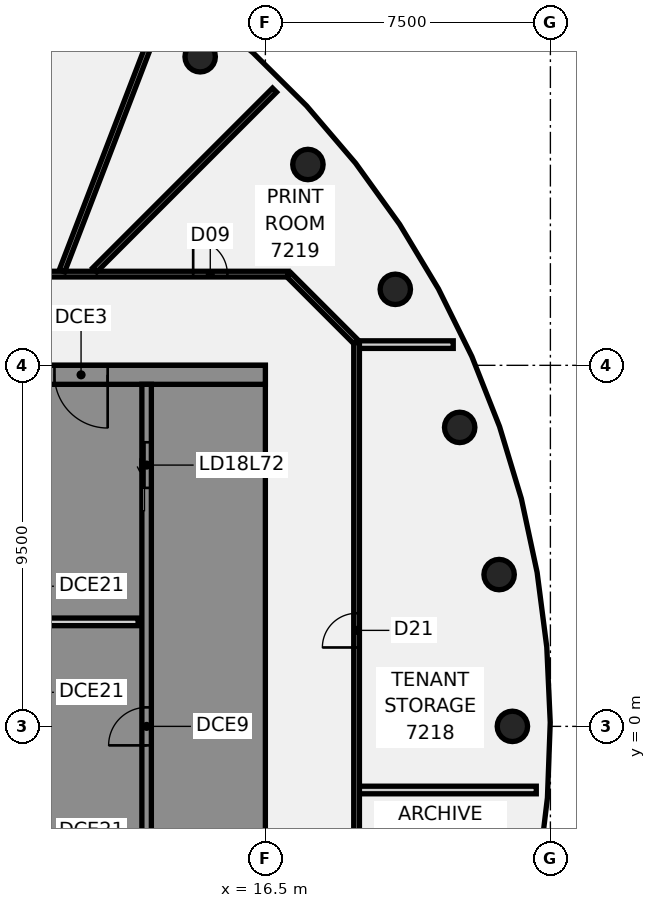
"""IFC4 building model, lengths in metres.
Left out: names, types, materials, properties, quantities, classifications, styles, units other than length and angle.
Written with IfcOpenShell. Run it as: python <this file> out.ifc"""

import sys

from ifc_helpers import new_model, si_unit, direction, frame, frame_2d, origin, origin_2d, place, context, subcontext, project, spatial, polyline, rectangle, circle, outline, extrude, element, fill, save


model = new_model("IFC4")
c1 = context("Model", 3, precision=1e-05, world=origin(), true_north=direction((0.0, 1.0)))
c2 = subcontext(c1, "Body", "Model", "MODEL_VIEW")
j1 = project(units=[si_unit("LENGTHUNIT", "METRE"), si_unit("PLANEANGLEUNIT", "RADIAN")], contexts=[c1])
p1 = place(None, origin())
s1 = spatial("IfcSite", under=j1, at=p1, CompositionType="ELEMENT")
p2 = place(p1, origin())
s2 = spatial("IfcBuilding", under=s1, at=p2, CompositionType="ELEMENT")
p3 = place(p2, frame((0.0, 0.0, 287.4)))
s3 = spatial("IfcBuildingStorey", under=s2, at=p3, CompositionType="ELEMENT", Elevation=287.4)
for number, where, z_axis, x_axis in (
    (1, (23.0, 0.0, -0.2), (0.0, 0.0, 1.0), (1.0, 0.0, 0.0)),
    (2, (22.651, 3.994, -0.2), (0.0, 0.0, 1.0), (1.0, 0.0, 0.0)),
    (3, (21.613, 7.866, -0.2), (0.0, 0.0, 1.0), (1.0, 0.0, 0.0)),
    (4, (19.919, 11.5, -0.2), (0.0, 0.0, 1.0), (1.0, 0.0, 0.0)),
    (5, (17.619, 14.784, -0.2), (0.0, 0.0, 1.0), (1.0, 0.0, 0.0)),
    (6, (14.784, 17.619, -0.2), (0.0, 0.0, 1.0), (1.0, 0.0, 0.0)),
):
    element("IfcColumn", number, at=place(p3, frame(where, z_axis=z_axis, x_axis=x_axis)), inside=s3, PredefinedType="COLUMN", context=c2, shape_type="SweptSolid", body=[
        extrude(circle(Radius=0.4, at=origin_2d()), origin(), (0.0, 0.0, 1.0), 7.0),
    ])
p4 = place(p3, frame((17.128, 11.872, 0.0), z_axis=(0.0, 0.0, 1.0), x_axis=(0.707106781187, -0.707106781187, 0.0)))
e7 = element("IfcWall", 7, at=p4, inside=s3, PredefinedType="PARTITIONING", context=c2, shape_type="SweptSolid", body=[
    extrude(rectangle(XDim=2.486, YDim=0.15, at=frame_2d((1.243, 0.0))), origin(), (0.0, 0.0, 1.0), 6.1),
])
p5 = place(p3, frame((-17.065, 11.9, 0.0), z_axis=(0.0, 0.0, 1.0), x_axis=(1.0, 0.0, 0.0)))
e8 = element("IfcWall", 8, at=p5, inside=s3, PredefinedType="PARTITIONING", context=c2, shape_type="SweptSolid", body=[
    extrude(rectangle(XDim=34.165, YDim=0.15, at=frame_2d((17.083, 0.0))), origin(), (0.0, 0.0, 1.0), 6.1),
])
p6 = place(p5, frame((24.252, 0.0, 0.0)))
e9 = element("IfcOpeningElement", 9, at=p6, cuts=e8, PredefinedType="OPENING", context=c2, shape_type="SweptSolid", body=[
    extrude(rectangle(XDim=1.8, YDim=2.1, at=frame_2d((0.9, 1.05))), frame((0.0, 0.085, 0.0), z_axis=(0.0, -1.0, 0.0), x_axis=(1.0, 0.0, 0.0)), (0.0, 0.0, 1.0), 0.17),
])
p7 = place(p5, frame((31.665, 0.0, 0.0)))
e10 = element("IfcOpeningElement", 10, at=p7, cuts=e8, PredefinedType="OPENING", context=c2, shape_type="SweptSolid", body=[
    extrude(rectangle(XDim=0.9, YDim=2.1, at=frame_2d((0.45, 1.05))), frame((0.0, 0.085, 0.0), z_axis=(0.0, -1.0, 0.0), x_axis=(1.0, 0.0, 0.0)), (0.0, 0.0, 1.0), 0.17),
])
p8 = place(p5, frame((10.415, 0.0, 0.0)))
e11 = element("IfcOpeningElement", 11, at=p8, cuts=e8, PredefinedType="OPENING", context=c2, shape_type="SweptSolid", body=[
    extrude(rectangle(XDim=1.8, YDim=2.1, at=frame_2d((0.9, 1.05))), frame((0.0, 0.085, 0.0), z_axis=(0.0, -1.0, 0.0), x_axis=(1.0, 0.0, 0.0)), (0.0, 0.0, 1.0), 0.17),
])
p9 = place(p3, frame((18.955, -1.674, 0.0), z_axis=(0.0, 0.0, 1.0), x_axis=(1.0, 0.0, 0.0)))
e12 = element("IfcWall", 12, at=p9, inside=s3, PredefinedType="PARTITIONING", context=c2, shape_type="SweptSolid", body=[
    extrude(rectangle(XDim=4.674, YDim=0.2, at=frame_2d((2.337, 0.0))), origin(), (0.0, 0.0, 1.0), 6.1),
])
p10 = place(p3, frame((18.955, 10.045, 0.0), z_axis=(0.0, 0.0, 1.0), x_axis=(1.0, 0.0, 0.0)))
e13 = element("IfcWall", 13, at=p10, inside=s3, PredefinedType="PARTITIONING", context=c2, shape_type="SweptSolid", body=[
    extrude(rectangle(XDim=2.489, YDim=0.2, at=frame_2d((1.244, 0.0))), origin(), (0.0, 0.0, 1.0), 6.1),
])
p11 = place(p3, frame((12.01, 12.01, 0.0), z_axis=(0.0, 0.0, 1.0), x_axis=(0.707106781187, 0.707106781187, 0.0)))
e14 = element("IfcWall", 14, at=p11, inside=s3, PredefinedType="PARTITIONING", context=c2, shape_type="SweptSolid", body=[
    extrude(rectangle(XDim=6.691, YDim=0.15, at=frame_2d((3.345, 0.0))), origin(), (0.0, 0.0, 1.0), 6.1),
])
p12 = place(p3, frame((11.147, 11.984, 0.0), z_axis=(0.0, 0.0, 1.0), x_axis=(0.358991844547, 0.933340696396, 0.0)))
e15 = element("IfcWall", 15, at=p12, inside=s3, PredefinedType="PARTITIONING", context=c2, shape_type="SweptSolid", body=[
    extrude(rectangle(XDim=7.69, YDim=0.15, at=frame_2d((3.845, 0.0))), origin(), (0.0, 0.0, 1.0), 6.1),
])
p13 = place(p3, frame((18.9, -10.1, 0.0), z_axis=(0.0, 0.0, 1.0), x_axis=(0.0, 1.0, 0.0)))
e16 = element("IfcWall", 16, at=p13, inside=s3, PredefinedType="PARTITIONING", context=c2, shape_type="SweptSolid", body=[
    extrude(rectangle(XDim=20.2, YDim=0.15, at=frame_2d((10.1, 0.0))), origin(), (0.0, 0.0, 1.0), 6.1),
])
p14 = place(p13, frame((4.95, 0.0, 0.0)))
e17 = element("IfcOpeningElement", 17, at=p14, cuts=e16, PredefinedType="OPENING", context=c2, shape_type="SweptSolid", body=[
    extrude(rectangle(XDim=0.9, YDim=2.1, at=frame_2d((0.45, 1.05))), frame((0.0, 0.085, 0.0), z_axis=(0.0, -1.0, 0.0), x_axis=(1.0, 0.0, 0.0)), (0.0, 0.0, 1.0), 0.17),
])
p15 = place(p13, frame((12.176, 0.0, 0.0)))
e18 = element("IfcOpeningElement", 18, at=p15, cuts=e16, PredefinedType="OPENING", context=c2, shape_type="SweptSolid", body=[
    extrude(rectangle(XDim=0.9, YDim=2.1, at=frame_2d((0.45, 1.05))), frame((0.0, 0.085, 0.0), z_axis=(0.0, -1.0, 0.0), x_axis=(1.0, 0.0, 0.0)), (0.0, 0.0, 1.0), 0.17),
])
p16 = place(p3, frame((16.5, 9.25, 0.0), z_axis=(0.0, 0.0, 1.0), x_axis=(-1.0, 0.0, 0.0)))
e19 = element("IfcWall", 19, at=p16, inside=s3, PredefinedType="SHEAR", context=c2, shape_type="SweptSolid", body=[
    extrude(rectangle(XDim=13.0, YDim=0.5, at=frame_2d((6.5, 0.0))), origin(), (0.0, 0.0, 1.0), 6.8),
])
p17 = place(p16, frame((4.15, 0.0, 0.0)))
e20 = element("IfcOpeningElement", 20, at=p17, cuts=e19, PredefinedType="OPENING", context=c2, shape_type="SweptSolid", body=[
    extrude(rectangle(XDim=1.4, YDim=2.1, at=frame_2d((0.7, 1.05))), frame((0.0, 0.26, 0.0), z_axis=(0.0, -1.0, 0.0), x_axis=(1.0, 0.0, 0.0)), (0.0, 0.0, 1.0), 0.52),
])
p18 = place(p3, frame((13.15, 2.75, 0.0), z_axis=(0.0, 0.0, 1.0), x_axis=(-1.0, 0.0, 0.0)))
e21 = element("IfcWall", 21, at=p18, inside=s3, PredefinedType="PARTITIONING", context=c2, shape_type="SweptSolid", body=[
    extrude(rectangle(XDim=3.0, YDim=0.2, at=frame_2d((1.5, 0.0))), origin(), (0.0, 0.0, 1.0), 6.8),
])
p19 = place(p3, origin())
e22 = element("IfcWall", 22, at=p19, inside=s3, PredefinedType="SHEAR", context=c2, shape_type="SweptSolid", body=[
    extrude(outline(polyline([(13.5, -8.125), (13.5, -9.0), (16.0, -9.0), (16.5, -9.0), (16.5, 9.0), (16.0, 9.0), (13.5, 9.0), (13.5, 8.125), (16.0, 8.125), (16.0, 5.625), (13.5, 5.625), (13.5, 5.375), (16.0, 5.375), (16.0, -5.375), (13.5, -5.375), (13.5, -5.625), (16.0, -5.625), (16.0, -8.125), (13.5, -8.125)])), origin(), (0.0, 0.0, 1.0), 6.8),
])
p20 = place(p3, frame((13.375, -9.0, 0.0), z_axis=(0.0, 0.0, 1.0), x_axis=(0.0, 1.0, 0.0)))
e23 = element("IfcWall", 23, at=p20, inside=s3, PredefinedType="SHEAR", context=c2, shape_type="SweptSolid", body=[
    extrude(rectangle(XDim=18.0, YDim=0.25, at=frame_2d((9.0, 0.0))), origin(), (0.0, 0.0, 1.0), 6.8),
])
p21 = place(p20, frame((1.425, 0.0, 0.0)))
e24 = element("IfcOpeningElement", 24, at=p21, cuts=e23, PredefinedType="OPENING", context=c2, shape_type="SweptSolid", body=[
    extrude(rectangle(XDim=1.4, YDim=2.1, at=frame_2d((0.7, 1.05))), frame((0.0, 0.135, 0.0), z_axis=(0.0, -1.0, 0.0), x_axis=(1.0, 0.0, 0.0)), (0.0, 0.0, 1.0), 0.27),
])
p22 = place(p20, frame((15.275, 0.0, 0.0)))
e25 = element("IfcOpeningElement", 25, at=p22, cuts=e23, PredefinedType="OPENING", context=c2, shape_type="SweptSolid", body=[
    extrude(rectangle(XDim=1.2, YDim=2.1, at=frame_2d((0.6, 1.05))), frame((0.0, 0.135, 0.0), z_axis=(0.0, -1.0, 0.0), x_axis=(1.0, 0.0, 0.0)), (0.0, 0.0, 1.0), 0.27),
])
p23 = place(p20, frame((8.5, 0.0, 0.0)))
e26 = element("IfcOpeningElement", 26, at=p23, cuts=e23, PredefinedType="OPENING", context=c2, shape_type="SweptSolid", body=[
    extrude(rectangle(XDim=1.0, YDim=2.1, at=frame_2d((0.5, 1.05))), frame((0.0, 0.135, 0.0), z_axis=(0.0, -1.0, 0.0), x_axis=(1.0, 0.0, 0.0)), (0.0, 0.0, 1.0), 0.27),
])
p24 = place(p7, origin())
e27 = element("IfcDoor", 27, at=p24, inside=s3, OperationType="SINGLE_SWING_LEFT", PredefinedType="DOOR", context=c2, shape_type="SweptSolid", body=[
    extrude(rectangle(XDim=0.9, YDim=2.1, at=frame_2d((0.45, 1.05))), frame((0.0, 0.025, 0.0), z_axis=(0.0, -1.0, 0.0), x_axis=(1.0, 0.0, 0.0)), (0.0, 0.0, 1.0), 0.05),
])
fill(e10, e27)
p25 = place(p15, frame((0.9, 0.0, 0.0), z_axis=(0.0, 0.0, 1.0), x_axis=(-1.0, 0.0, 0.0)))
e28 = element("IfcDoor", 28, at=p25, inside=s3, OperationType="SINGLE_SWING_RIGHT", PredefinedType="DOOR", context=c2, shape_type="SweptSolid", body=[
    extrude(rectangle(XDim=0.9, YDim=2.1, at=frame_2d((0.45, 1.05))), frame((0.0, 0.025, 0.0), z_axis=(0.0, -1.0, 0.0), x_axis=(1.0, 0.0, 0.0)), (0.0, 0.0, 1.0), 0.05),
])
fill(e18, e28)
p26 = place(p17, origin())
e29 = element("IfcDoor", 29, at=p26, inside=s3, OperationType="SINGLE_SWING_LEFT", PredefinedType="DOOR", context=c2, shape_type="SweptSolid", body=[
    extrude(rectangle(XDim=1.4, YDim=2.1, at=frame_2d((0.7, 1.05))), frame((0.0, 0.025, 0.0), z_axis=(0.0, -1.0, 0.0), x_axis=(1.0, 0.0, 0.0)), (0.0, 0.0, 1.0), 0.05),
])
fill(e20, e29)
p27 = place(p22, origin())
e30 = element("IfcDoor", 30, at=p27, inside=s3, OperationType="SLIDING_TO_LEFT", PredefinedType="DOOR", context=c2, shape_type="SweptSolid", body=[
    extrude(rectangle(XDim=1.2, YDim=2.1, at=frame_2d((0.6, 1.05))), frame((0.0, 0.025, 0.0), z_axis=(0.0, -1.0, 0.0), x_axis=(1.0, 0.0, 0.0)), (0.0, 0.0, 1.0), 0.05),
])
fill(e25, e30)
p28 = place(p23, origin())
e31 = element("IfcDoor", 31, at=p28, inside=s3, OperationType="SINGLE_SWING_LEFT", PredefinedType="DOOR", context=c2, shape_type="SweptSolid", body=[
    extrude(rectangle(XDim=1.0, YDim=2.1, at=frame_2d((0.5, 1.05))), frame((0.0, 0.025, 0.0), z_axis=(0.0, -1.0, 0.0), x_axis=(1.0, 0.0, 0.0)), (0.0, 0.0, 1.0), 0.05),
])
fill(e26, e31)
save(model, sys.argv[1])
